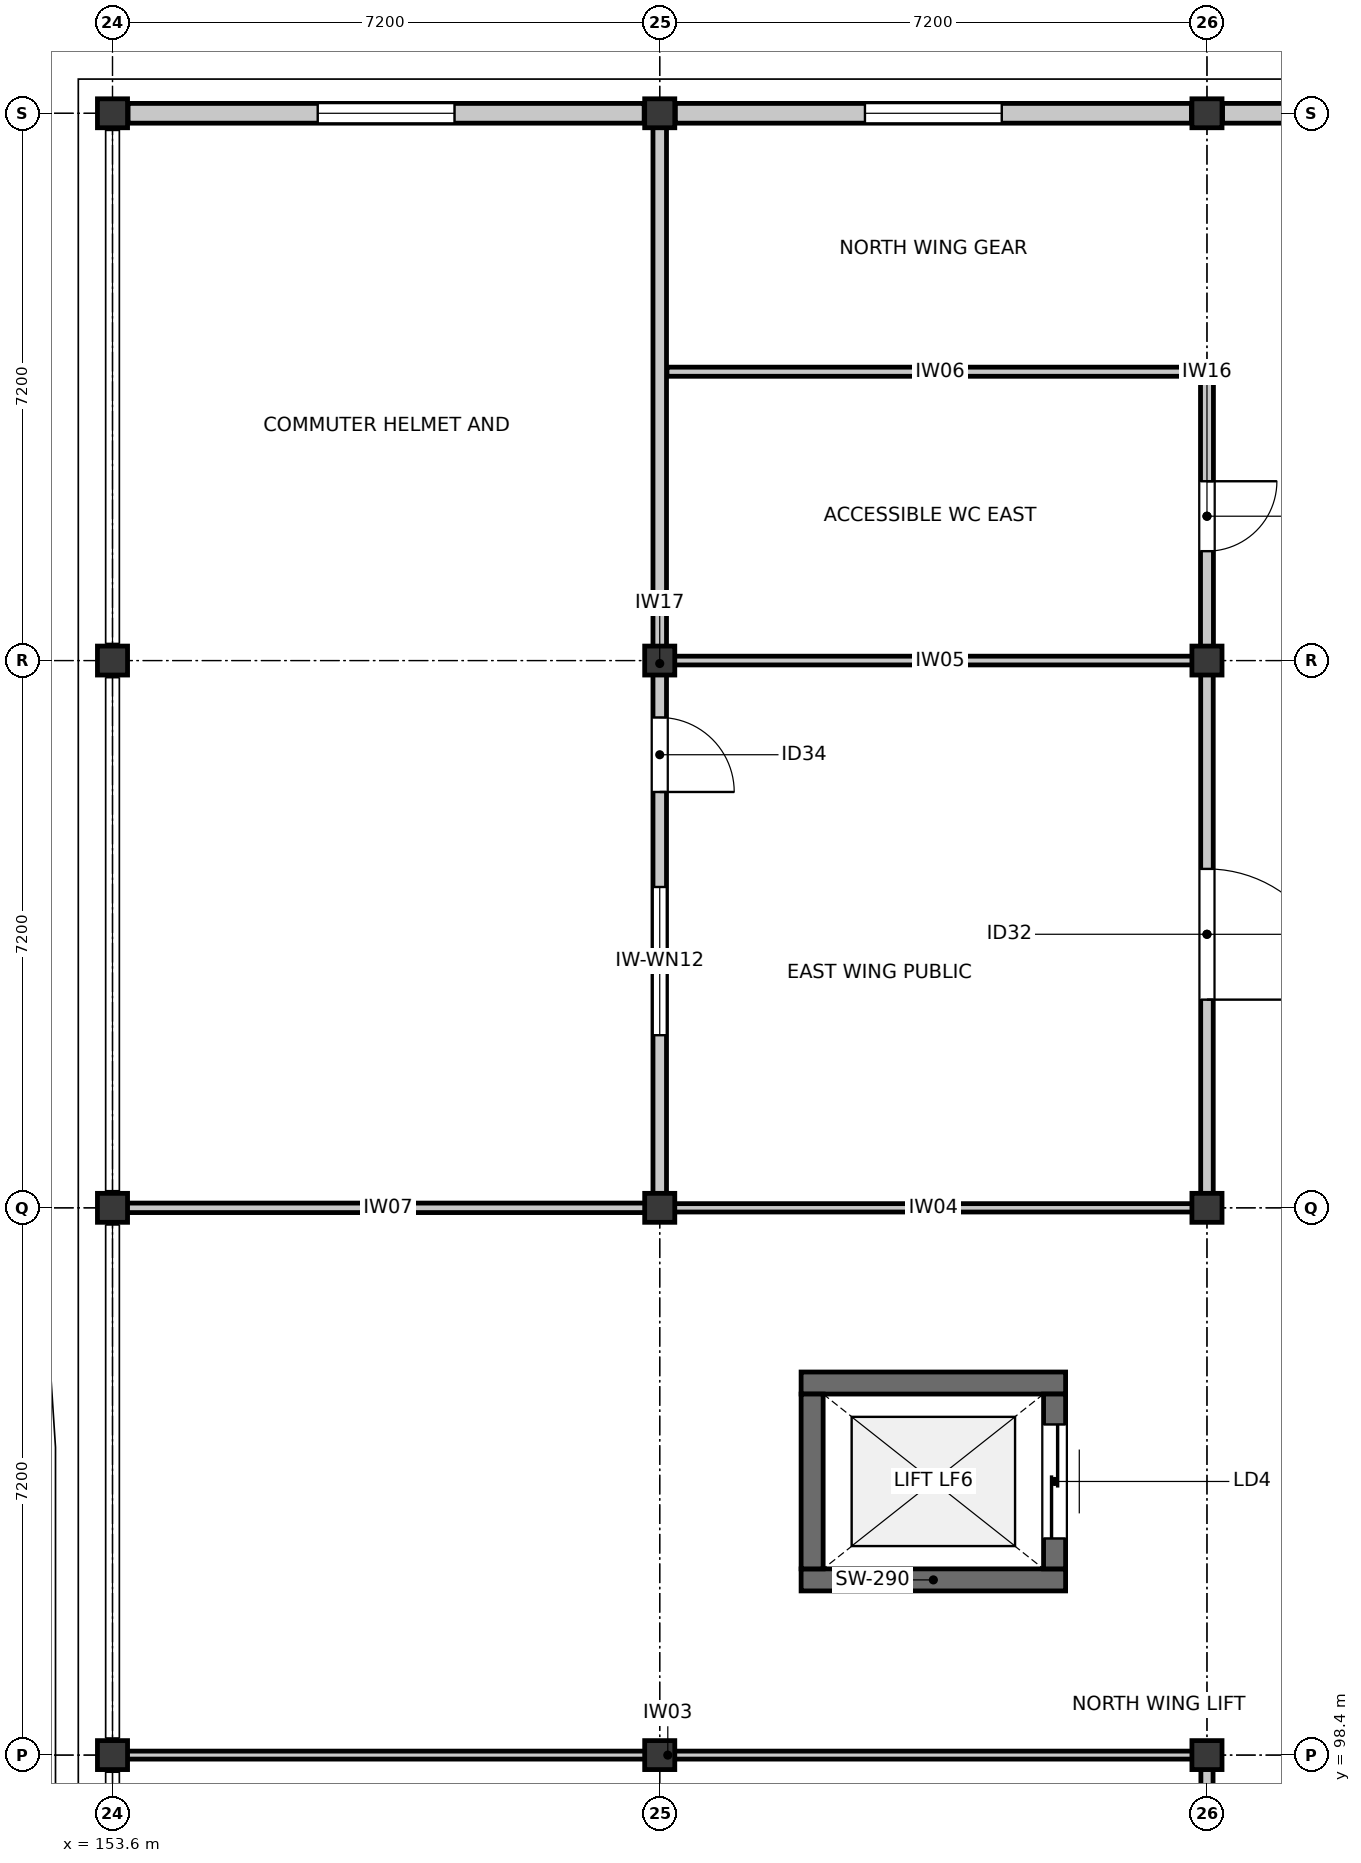
"""IFC4 building model, lengths in metres.
Left out: names, types, materials, properties, quantities, classifications, styles, units other than length and angle.
Written with IfcOpenShell. Run it as: python <this file> out.ifc"""

import sys

from ifc_helpers import new_model, si_unit, direction, frame, frame_2d, origin, origin_2d, place, context, subcontext, project, spatial, rectangle, i_section, extrude, element, fill, save


model = new_model("IFC4")
c1 = context("Model", 3, precision=1e-05, world=origin(), true_north=direction((0.0, 1.0)))
c2 = subcontext(c1, "Body", "Model", "MODEL_VIEW")
j1 = project(units=[si_unit("LENGTHUNIT", "METRE"), si_unit("PLANEANGLEUNIT", "RADIAN")], contexts=[c1])
p1 = place(None, origin())
s1 = spatial("IfcSite", under=j1, at=p1, CompositionType="ELEMENT")
p2 = place(p1, origin())
s2 = spatial("IfcBuilding", under=s1, at=p2, CompositionType="ELEMENT")
p3 = place(p2, origin())
s3 = spatial("IfcBuildingStorey", under=s2, at=p3, CompositionType="ELEMENT", Elevation=0.0)
for number, where, z_axis, x_axis in (
    (1, (153.6, 98.4, 0.0), (0.0, 0.0, 1.0), (1.0, 0.0, 0.0)),
    (2, (153.6, 105.6, 0.0), (0.0, 0.0, 1.0), (1.0, 0.0, 0.0)),
    (3, (153.6, 112.8, 0.0), (0.0, 0.0, 1.0), (1.0, 0.0, 0.0)),
    (4, (153.6, 120.0, 0.0), (0.0, 0.0, 1.0), (1.0, 0.0, 0.0)),
    (5, (160.8, 98.4, 0.0), (0.0, 0.0, 1.0), (1.0, 0.0, 0.0)),
    (6, (160.8, 105.6, 0.0), (0.0, 0.0, 1.0), (1.0, 0.0, 0.0)),
    (7, (160.8, 112.8, 0.0), (0.0, 0.0, 1.0), (1.0, 0.0, 0.0)),
    (8, (160.8, 120.0, 0.0), (0.0, 0.0, 1.0), (1.0, 0.0, 0.0)),
    (9, (168.0, 98.4, 0.0), (0.0, 0.0, 1.0), (1.0, 0.0, 0.0)),
    (10, (168.0, 105.6, 0.0), (0.0, 0.0, 1.0), (1.0, 0.0, 0.0)),
    (11, (168.0, 112.8, 0.0), (0.0, 0.0, 1.0), (1.0, 0.0, 0.0)),
    (12, (168.0, 120.0, 0.0), (0.0, 0.0, 1.0), (1.0, 0.0, 0.0)),
):
    element("IfcColumn", number, at=place(p3, frame(where, z_axis=z_axis, x_axis=x_axis)), inside=s3, PredefinedType="COLUMN", context=c2, shape_type="SweptSolid", body=[
        extrude(i_section(OverallWidth=0.396, OverallDepth=0.381, WebThickness=0.019, FlangeThickness=0.03, FilletRadius=0.015, at=origin_2d()), origin(), (0.0, 0.0, 1.0), 5.4),
    ])
p4 = place(p3, frame((153.805, 120.0, 0.0), z_axis=(0.0, 0.0, 1.0), x_axis=(1.0, 0.0, 0.0)))
e13 = element("IfcWall", 13, at=p4, inside=s3, PredefinedType="STANDARD", context=c2, shape_type="SweptSolid", body=[
    extrude(rectangle(XDim=6.79, YDim=0.26, at=frame_2d((3.395, 0.0))), origin(), (0.0, 0.0, 1.0), 4.442),
])
p5 = place(p4, frame((2.495, 0.0, 0.9)))
e14 = element("IfcOpeningElement", 14, at=p5, cuts=e13, PredefinedType="OPENING", context=c2, shape_type="SweptSolid", body=[
    extrude(rectangle(XDim=1.8, YDim=1.5, at=frame_2d((0.9, 0.75))), frame((0.0, 0.14, 0.0), z_axis=(0.0, -1.0, 0.0), x_axis=(1.0, 0.0, 0.0)), (0.0, 0.0, 1.0), 0.28),
])
p6 = place(p3, frame((161.005, 120.0, 0.0), z_axis=(0.0, 0.0, 1.0), x_axis=(1.0, 0.0, 0.0)))
e15 = element("IfcWall", 15, at=p6, inside=s3, PredefinedType="STANDARD", context=c2, shape_type="SweptSolid", body=[
    extrude(rectangle(XDim=6.79, YDim=0.26, at=frame_2d((3.395, 0.0))), origin(), (0.0, 0.0, 1.0), 4.442),
])
p7 = place(p6, frame((2.495, 0.0, 0.9)))
e16 = element("IfcOpeningElement", 16, at=p7, cuts=e15, PredefinedType="OPENING", context=c2, shape_type="SweptSolid", body=[
    extrude(rectangle(XDim=1.8, YDim=1.5, at=frame_2d((0.9, 0.75))), frame((0.0, 0.14, 0.0), z_axis=(0.0, -1.0, 0.0), x_axis=(1.0, 0.0, 0.0)), (0.0, 0.0, 1.0), 0.28),
])
p8 = place(p3, frame((168.205, 120.0, 0.0), z_axis=(0.0, 0.0, 1.0), x_axis=(1.0, 0.0, 0.0)))
e17 = element("IfcWall", 17, at=p8, inside=s3, PredefinedType="STANDARD", context=c2, shape_type="SweptSolid", body=[
    extrude(rectangle(XDim=6.79, YDim=0.26, at=frame_2d((3.395, 0.0))), origin(), (0.0, 0.0, 1.0), 4.442),
])
p9 = place(p8, frame((2.495, 0.0, 0.9)))
e18 = element("IfcOpeningElement", 18, at=p9, cuts=e17, PredefinedType="OPENING", context=c2, shape_type="SweptSolid", body=[
    extrude(rectangle(XDim=1.8, YDim=1.5, at=frame_2d((0.9, 0.75))), frame((0.0, 0.14, 0.0), z_axis=(0.0, -1.0, 0.0), x_axis=(1.0, 0.0, 0.0)), (0.0, 0.0, 1.0), 0.28),
])
for number, where, z_axis, x_axis in (
    (19, (166.14, 100.705, 0.0), (0.0, 0.0, 1.0), (-1.0, 0.0, 0.0)),
    (20, (162.66, 103.295, 0.0), (0.0, 0.0, 1.0), (1.0, 0.0, 0.0)),
):
    element("IfcWall", number, at=place(p3, frame(where, z_axis=z_axis, x_axis=x_axis)), inside=s3, PredefinedType="SHEAR", context=c2, shape_type="SweptSolid", body=[
        extrude(rectangle(XDim=3.48, YDim=0.29, at=frame_2d((1.74, 0.0))), origin(), (0.0, 0.0, 1.0), 5.14),
    ])
p10 = place(p3, frame((162.805, 100.85, 0.0), z_axis=(0.0, 0.0, 1.0), x_axis=(0.0, 1.0, 0.0)))
e21 = element("IfcWall", 21, at=p10, inside=s3, PredefinedType="SHEAR", context=c2, shape_type="SweptSolid", body=[
    extrude(rectangle(XDim=2.3, YDim=0.29, at=frame_2d((1.15, 0.0))), origin(), (0.0, 0.0, 1.0), 5.14),
])
p11 = place(p3, frame((165.995, 103.15, 0.0), z_axis=(0.0, 0.0, 1.0), x_axis=(0.0, -1.0, 0.0)))
e22 = element("IfcWall", 22, at=p11, inside=s3, PredefinedType="SHEAR", context=c2, shape_type="SweptSolid", body=[
    extrude(rectangle(XDim=2.3, YDim=0.29, at=frame_2d((1.15, 0.0))), origin(), (0.0, 0.0, 1.0), 5.14),
])
p12 = place(p11, frame((0.4, 0.0, 0.0)))
e23 = element("IfcOpeningElement", 23, at=p12, cuts=e22, PredefinedType="OPENING", context=c2, shape_type="SweptSolid", body=[
    extrude(rectangle(XDim=1.5, YDim=2.3, at=frame_2d((0.75, 1.15))), frame((0.0, 0.155, 0.0), z_axis=(0.0, -1.0, 0.0), x_axis=(1.0, 0.0, 0.0)), (0.0, 0.0, 1.0), 0.31),
])
p13 = place(p3, frame((153.732, 98.4, 0.0), z_axis=(0.0, 0.0, 1.0), x_axis=(1.0, 0.0, 0.0)))
e24 = element("IfcWall", 24, at=p13, inside=s3, PredefinedType="PARTITIONING", context=c2, shape_type="SweptSolid", body=[
    extrude(rectangle(XDim=14.348, YDim=0.105, at=frame_2d((7.174, 0.0))), origin(), (0.0, 0.0, 1.0), 4.437),
])
p14 = place(p3, frame((168.08, 105.6, 0.0), z_axis=(0.0, 0.0, 1.0), x_axis=(-1.0, 0.0, 0.0)))
e25 = element("IfcWall", 25, at=p14, inside=s3, PredefinedType="PARTITIONING", context=c2, shape_type="SweptSolid", body=[
    extrude(rectangle(XDim=7.36, YDim=0.11, at=frame_2d((3.68, 0.0))), origin(), (0.0, 0.0, 1.0), 4.437),
])
p15 = place(p3, frame((160.895, 112.8, 0.0), z_axis=(0.0, 0.0, 1.0), x_axis=(1.0, 0.0, 0.0)))
e26 = element("IfcWall", 26, at=p15, inside=s3, PredefinedType="PARTITIONING", context=c2, shape_type="SweptSolid", body=[
    extrude(rectangle(XDim=7.185, YDim=0.115, at=frame_2d((3.593, 0.0))), origin(), (0.0, 0.0, 1.0), 4.437),
])
p16 = place(p3, frame((160.895, 116.6, 0.0), z_axis=(0.0, 0.0, 1.0), x_axis=(1.0, 0.0, 0.0)))
e27 = element("IfcWall", 27, at=p16, inside=s3, PredefinedType="PARTITIONING", context=c2, shape_type="SweptSolid", body=[
    extrude(rectangle(XDim=7.185, YDim=0.12, at=frame_2d((3.593, 0.0))), origin(), (0.0, 0.0, 1.0), 4.437),
])
p17 = place(p3, frame((160.718, 105.6, 0.0), z_axis=(0.0, 0.0, 1.0), x_axis=(-1.0, 0.0, 0.0)))
e28 = element("IfcWall", 28, at=p17, inside=s3, PredefinedType="PARTITIONING", context=c2, shape_type="SweptSolid", body=[
    extrude(rectangle(XDim=6.986, YDim=0.125, at=frame_2d((3.493, 0.0))), origin(), (0.0, 0.0, 1.0), 4.437),
])
p18 = place(p3, frame((168.0, 98.346, 0.0), z_axis=(0.0, 0.0, 1.0), x_axis=(0.0, -1.0, 0.0)))
e29 = element("IfcWall", 29, at=p18, inside=s3, PredefinedType="PARTITIONING", context=c2, shape_type="SweptSolid", body=[
    extrude(rectangle(XDim=21.494, YDim=0.16, at=frame_2d((10.747, 0.0))), origin(), (0.0, 0.0, 1.0), 4.437),
])
p19 = place(p18, frame((9.947, 0.0, 0.0)))
e30 = element("IfcOpeningElement", 30, at=p19, cuts=e29, PredefinedType="OPENING", context=c2, shape_type="SweptSolid", body=[
    extrude(rectangle(XDim=1.6, YDim=2.22, at=frame_2d((0.8, 1.11))), frame((0.0, 0.09, 0.0), z_axis=(0.0, -1.0, 0.0), x_axis=(1.0, 0.0, 0.0)), (0.0, 0.0, 1.0), 0.18),
])
p20 = place(p3, frame((168.0, 112.74, 0.0), z_axis=(0.0, 0.0, 1.0), x_axis=(0.0, -1.0, 0.0)))
e31 = element("IfcWall", 31, at=p20, inside=s3, PredefinedType="PARTITIONING", context=c2, shape_type="SweptSolid", body=[
    extrude(rectangle(XDim=7.083, YDim=0.165, at=frame_2d((3.542, 0.0))), origin(), (0.0, 0.0, 1.0), 4.437),
])
p21 = place(p20, frame((2.681, 0.0, 0.0)))
e32 = element("IfcOpeningElement", 32, at=p21, cuts=e31, PredefinedType="OPENING", context=c2, shape_type="SweptSolid", body=[
    extrude(rectangle(XDim=1.72, YDim=2.22, at=frame_2d((0.86, 1.11))), frame((0.0, 0.093, 0.0), z_axis=(0.0, -1.0, 0.0), x_axis=(1.0, 0.0, 0.0)), (0.0, 0.0, 1.0), 0.185),
])
p22 = place(p3, frame((168.0, 116.538, 0.0), z_axis=(0.0, 0.0, 1.0), x_axis=(0.0, -1.0, 0.0)))
e33 = element("IfcWall", 33, at=p22, inside=s3, PredefinedType="PARTITIONING", context=c2, shape_type="SweptSolid", body=[
    extrude(rectangle(XDim=3.678, YDim=0.17, at=frame_2d((1.839, 0.0))), origin(), (0.0, 0.0, 1.0), 4.437),
])
p23 = place(p22, frame((1.379, 0.0, 0.0)))
e34 = element("IfcOpeningElement", 34, at=p23, cuts=e33, PredefinedType="OPENING", context=c2, shape_type="SweptSolid", body=[
    extrude(rectangle(XDim=0.92, YDim=2.28, at=frame_2d((0.46, 1.14))), frame((0.0, 0.095, 0.0), z_axis=(0.0, -1.0, 0.0), x_axis=(1.0, 0.0, 0.0)), (0.0, 0.0, 1.0), 0.19),
])
p24 = place(p3, frame((160.8, 119.858, 0.0), z_axis=(0.0, 0.0, 1.0), x_axis=(0.0, -1.0, 0.0)))
e35 = element("IfcWall", 35, at=p24, inside=s3, PredefinedType="PARTITIONING", context=c2, shape_type="SweptSolid", body=[
    extrude(rectangle(XDim=14.194, YDim=0.178, at=frame_2d((7.097, 0.0))), origin(), (0.0, 0.0, 1.0), 4.437),
])
p25 = place(p24, frame((7.807, 0.0, 0.0)))
e36 = element("IfcOpeningElement", 36, at=p25, cuts=e35, PredefinedType="OPENING", context=c2, shape_type="SweptSolid", body=[
    extrude(rectangle(XDim=0.98, YDim=2.28, at=frame_2d((0.49, 1.14))), frame((0.0, 0.099, 0.0), z_axis=(0.0, -1.0, 0.0), x_axis=(1.0, 0.0, 0.0)), (0.0, 0.0, 1.0), 0.198),
])
p26 = place(p24, frame((10.037, 0.0, 0.95)))
e37 = element("IfcOpeningElement", 37, at=p26, cuts=e35, PredefinedType="OPENING", context=c2, shape_type="SweptSolid", body=[
    extrude(rectangle(XDim=1.95, YDim=1.3, at=frame_2d((0.975, 0.65))), frame((0.0, 0.099, 0.0), z_axis=(0.0, -1.0, 0.0), x_axis=(1.0, 0.0, 0.0)), (0.0, 0.0, 1.0), 0.198),
])
p27 = place(p5, origin())
e38 = element("IfcWindow", 38, at=p27, inside=s3, PartitioningType="SINGLE_PANEL", PredefinedType="WINDOW", context=c2, shape_type="SweptSolid", body=[
    extrude(rectangle(XDim=1.8, YDim=1.5, at=frame_2d((0.9, 0.75))), frame((0.0, 0.03, 0.0), z_axis=(0.0, -1.0, 0.0), x_axis=(1.0, 0.0, 0.0)), (0.0, 0.0, 1.0), 0.06),
])
fill(e14, e38)
p28 = place(p7, origin())
e39 = element("IfcWindow", 39, at=p28, inside=s3, PartitioningType="SINGLE_PANEL", PredefinedType="WINDOW", context=c2, shape_type="SweptSolid", body=[
    extrude(rectangle(XDim=1.8, YDim=1.5, at=frame_2d((0.9, 0.75))), frame((0.0, 0.03, 0.0), z_axis=(0.0, -1.0, 0.0), x_axis=(1.0, 0.0, 0.0)), (0.0, 0.0, 1.0), 0.06),
])
fill(e16, e39)
p29 = place(p12, origin())
e40 = element("IfcDoor", 40, at=p29, inside=s3, OperationType="DOUBLE_DOOR_SLIDING", PredefinedType="DOOR", context=c2, shape_type="SweptSolid", body=[
    extrude(rectangle(XDim=1.5, YDim=2.3, at=frame_2d((0.75, 1.15))), frame((0.0, 0.025, 0.0), z_axis=(0.0, -1.0, 0.0), x_axis=(1.0, 0.0, 0.0)), (0.0, 0.0, 1.0), 0.05),
])
fill(e23, e40)
p30 = place(p21, origin())
e41 = element("IfcDoor", 41, at=p30, inside=s3, OperationType="SINGLE_SWING_RIGHT", PredefinedType="DOOR", context=c2, shape_type="SweptSolid", body=[
    extrude(rectangle(XDim=1.72, YDim=2.22, at=frame_2d((0.86, 1.11))), frame((0.0, 0.025, 0.0), z_axis=(0.0, -1.0, 0.0), x_axis=(1.0, 0.0, 0.0)), (0.0, 0.0, 1.0), 0.05),
])
fill(e32, e41)
p31 = place(p23, origin())
e42 = element("IfcDoor", 42, at=p31, inside=s3, OperationType="SINGLE_SWING_LEFT", PredefinedType="DOOR", context=c2, shape_type="SweptSolid", body=[
    extrude(rectangle(XDim=0.92, YDim=2.28, at=frame_2d((0.46, 1.14))), frame((0.0, 0.025, 0.0), z_axis=(0.0, -1.0, 0.0), x_axis=(1.0, 0.0, 0.0)), (0.0, 0.0, 1.0), 0.05),
])
fill(e34, e42)
p32 = place(p25, origin())
e43 = element("IfcDoor", 43, at=p32, inside=s3, OperationType="SINGLE_SWING_RIGHT", PredefinedType="DOOR", context=c2, shape_type="SweptSolid", body=[
    extrude(rectangle(XDim=0.98, YDim=2.28, at=frame_2d((0.49, 1.14))), frame((0.0, 0.025, 0.0), z_axis=(0.0, -1.0, 0.0), x_axis=(1.0, 0.0, 0.0)), (0.0, 0.0, 1.0), 0.05),
])
fill(e36, e43)
p33 = place(p26, origin())
e44 = element("IfcWindow", 44, at=p33, inside=s3, PartitioningType="SINGLE_PANEL", PredefinedType="WINDOW", context=c2, shape_type="SweptSolid", body=[
    extrude(rectangle(XDim=1.95, YDim=1.3, at=frame_2d((0.975, 0.65))), frame((0.0, 0.03, 0.0), z_axis=(0.0, -1.0, 0.0), x_axis=(1.0, 0.0, 0.0)), (0.0, 0.0, 1.0), 0.06),
])
fill(e37, e44)
save(model, sys.argv[1])
